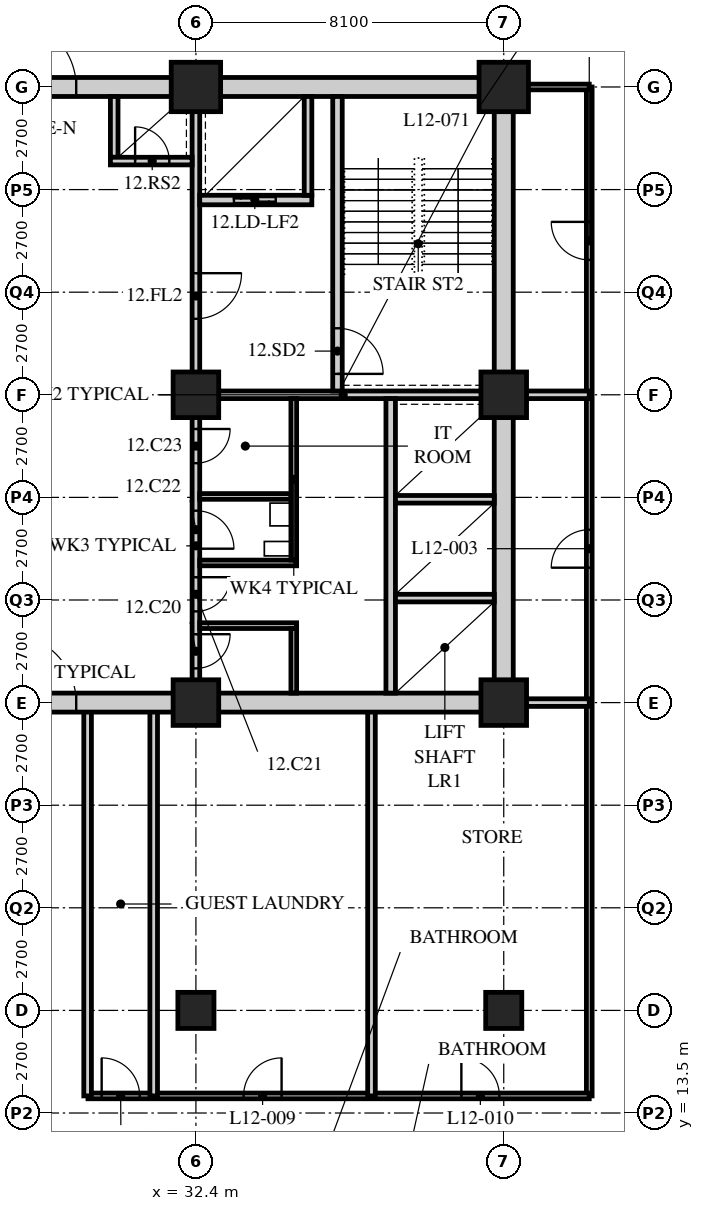
"""IFC4 building model, lengths in metres.
Left out: names, types, materials, properties, quantities, classifications, styles, units other than length and angle.
Written with IfcOpenShell. Run it as: python <this file> out.ifc"""

import sys

from ifc_helpers import new_model, si_unit, direction, frame, frame_2d, origin, origin_2d, place, context, subcontext, project, spatial, rectangle, hollow_rectangle, extrude, element, fill, save


model = new_model("IFC4")
c1 = context("Model", 3, precision=1e-05, world=origin(), true_north=direction((0.0, 1.0)))
c2 = subcontext(c1, "Body", "Model", "MODEL_VIEW")
j1 = project(units=[si_unit("LENGTHUNIT", "METRE"), si_unit("PLANEANGLEUNIT", "RADIAN")], contexts=[c1])
p1 = place(None, origin())
s1 = spatial("IfcSite", under=j1, at=p1, CompositionType="ELEMENT")
p2 = place(p1, origin())
s2 = spatial("IfcBuilding", under=s1, at=p2, CompositionType="ELEMENT")
p3 = place(p2, frame((0.0, 0.0, 53.4)))
s3 = spatial("IfcBuildingStorey", under=s2, at=p3, CompositionType="ELEMENT", Elevation=53.4)
p4 = place(p3, frame((32.4, 16.2, 0.0), z_axis=(0.0, 0.0, 1.0), x_axis=(1.0, 0.0, 0.0)))
e1 = element("IfcColumn", 1, at=p4, inside=s3, PredefinedType="COLUMN", context=c2, shape_type="SweptSolid", body=[
    extrude(hollow_rectangle(XDim=0.95, YDim=0.95, WallThickness=0.095, at=origin_2d()), origin(), (0.0, 0.0, 1.0), 3.4),
])
for number, where, z_axis, x_axis in (
    (2, (32.4, 24.3, 0.0), (0.0, 0.0, 1.0), (1.0, 0.0, 0.0)),
    (3, (32.4, 32.4, 0.0), (0.0, 0.0, 1.0), (1.0, 0.0, 0.0)),
):
    element("IfcColumn", number, at=place(p3, frame(where, z_axis=z_axis, x_axis=x_axis)), inside=s3, PredefinedType="COLUMN", context=c2, shape_type="SweptSolid", body=[
        extrude(hollow_rectangle(XDim=1.2, YDim=1.2, WallThickness=0.12, at=origin_2d()), origin(), (0.0, 0.0, 1.0), 3.4),
    ])
p5 = place(p3, frame((32.4, 40.5, 0.0), z_axis=(0.0, 0.0, 1.0), x_axis=(1.0, 0.0, 0.0)))
e4 = element("IfcColumn", 4, at=p5, inside=s3, PredefinedType="COLUMN", context=c2, shape_type="SweptSolid", body=[
    extrude(hollow_rectangle(XDim=1.3, YDim=1.3, WallThickness=0.13, at=origin_2d()), origin(), (0.0, 0.0, 1.0), 3.4),
])
p6 = place(p3, frame((40.5, 16.2, 0.0), z_axis=(0.0, 0.0, 1.0), x_axis=(1.0, 0.0, 0.0)))
e5 = element("IfcColumn", 5, at=p6, inside=s3, PredefinedType="COLUMN", context=c2, shape_type="SweptSolid", body=[
    extrude(hollow_rectangle(XDim=0.95, YDim=0.95, WallThickness=0.095, at=origin_2d()), origin(), (0.0, 0.0, 1.0), 3.4),
])
for number, where, z_axis, x_axis in (
    (6, (40.5, 24.3, 0.0), (0.0, 0.0, 1.0), (1.0, 0.0, 0.0)),
    (7, (40.5, 32.4, 0.0), (0.0, 0.0, 1.0), (1.0, 0.0, 0.0)),
):
    element("IfcColumn", number, at=place(p3, frame(where, z_axis=z_axis, x_axis=x_axis)), inside=s3, PredefinedType="COLUMN", context=c2, shape_type="SweptSolid", body=[
        extrude(hollow_rectangle(XDim=1.2, YDim=1.2, WallThickness=0.12, at=origin_2d()), origin(), (0.0, 0.0, 1.0), 3.4),
    ])
p7 = place(p3, frame((40.5, 40.5, 0.0), z_axis=(0.0, 0.0, 1.0), x_axis=(1.0, 0.0, 0.0)))
e8 = element("IfcColumn", 8, at=p7, inside=s3, PredefinedType="COLUMN", context=c2, shape_type="SweptSolid", body=[
    extrude(hollow_rectangle(XDim=1.3, YDim=1.3, WallThickness=0.13, at=origin_2d()), origin(), (0.0, 0.0, 1.0), 3.4),
])
p8 = place(p3, frame((42.75, 13.95, 0.0), z_axis=(0.0, 0.0, 1.0), x_axis=(0.0, 1.0, 0.0)))
e9 = element("IfcWall", 9, at=p8, inside=s3, PredefinedType="PARTITIONING", context=c2, shape_type="SweptSolid", body=[
    extrude(rectangle(XDim=26.55, YDim=0.15, at=frame_2d((13.275, 0.0))), origin(), (0.0, 0.0, 1.0), 3.19),
])
p9 = place(p8, frame((13.9, 0.0, 0.0)))
e10 = element("IfcOpeningElement", 10, at=p9, cuts=e9, PredefinedType="OPENING", context=c2, shape_type="SweptSolid", body=[
    extrude(rectangle(XDim=1.0, YDim=2.1, at=frame_2d((0.5, 1.05))), frame((0.0, 0.085, 0.0), z_axis=(0.0, -1.0, 0.0), x_axis=(1.0, 0.0, 0.0)), (0.0, 0.0, 1.0), 0.17),
])
p10 = place(p8, frame((22.0, 0.0, 0.0)))
e11 = element("IfcOpeningElement", 11, at=p10, cuts=e9, PredefinedType="OPENING", context=c2, shape_type="SweptSolid", body=[
    extrude(rectangle(XDim=1.0, YDim=2.1, at=frame_2d((0.5, 1.05))), frame((0.0, 0.085, 0.0), z_axis=(0.0, -1.0, 0.0), x_axis=(1.0, 0.0, 0.0)), (0.0, 0.0, 1.0), 0.17),
])
p11 = place(p3, frame((42.75, 40.5, 0.0), z_axis=(0.0, 0.0, 1.0), x_axis=(-1.0, 0.0, 0.0)))
e12 = element("IfcWall", 12, at=p11, inside=s3, PredefinedType="PARTITIONING", context=c2, shape_type="SweptSolid", body=[
    extrude(rectangle(XDim=2.05, YDim=0.15, at=frame_2d((1.025, 0.0))), origin(), (0.0, 0.0, 1.0), 2.578),
])
p12 = place(p3, frame((29.56, 13.95, 0.0), z_axis=(0.0, 0.0, 1.0), x_axis=(1.0, 0.0, 0.0)))
e13 = element("IfcWall", 13, at=p12, inside=s3, PredefinedType="PARTITIONING", context=c2, shape_type="SweptSolid", body=[
    extrude(rectangle(XDim=13.19, YDim=0.15, at=frame_2d((6.595, 0.0))), origin(), (0.0, 0.0, 1.0), 3.19),
])
p13 = place(p12, frame((0.36, 0.0, 0.0)))
e14 = element("IfcOpeningElement", 14, at=p13, cuts=e13, PredefinedType="OPENING", context=c2, shape_type="SweptSolid", body=[
    extrude(rectangle(XDim=1.0, YDim=2.1, at=frame_2d((0.5, 1.05))), frame((0.0, 0.085, 0.0), z_axis=(0.0, -1.0, 0.0), x_axis=(1.0, 0.0, 0.0)), (0.0, 0.0, 1.0), 0.17),
])
p14 = place(p12, frame((4.094, 0.0, 0.0)))
e15 = element("IfcOpeningElement", 15, at=p14, cuts=e13, PredefinedType="OPENING", context=c2, shape_type="SweptSolid", body=[
    extrude(rectangle(XDim=1.0, YDim=2.1, at=frame_2d((0.5, 1.05))), frame((0.0, 0.085, 0.0), z_axis=(0.0, -1.0, 0.0), x_axis=(1.0, 0.0, 0.0)), (0.0, 0.0, 1.0), 0.17),
])
p15 = place(p12, frame((9.825, 0.0, 0.0)))
e16 = element("IfcOpeningElement", 16, at=p15, cuts=e13, PredefinedType="OPENING", context=c2, shape_type="SweptSolid", body=[
    extrude(rectangle(XDim=1.0, YDim=2.1, at=frame_2d((0.5, 1.05))), frame((0.0, 0.085, 0.0), z_axis=(0.0, -1.0, 0.0), x_axis=(1.0, 0.0, 0.0)), (0.0, 0.0, 1.0), 0.17),
])
p16 = place(p3, frame((40.5, 32.4, 0.0), z_axis=(0.0, 0.0, 1.0), x_axis=(1.0, 0.0, 0.0)))
e17 = element("IfcWall", 17, at=p16, inside=s3, PredefinedType="SOLIDWALL", context=c2, shape_type="SweptSolid", body=[
    extrude(rectangle(XDim=2.25, YDim=0.2, at=frame_2d((1.125, 0.0))), origin(), (0.0, 0.0, 1.0), 2.578),
])
for number, where, z_axis, x_axis in (
    (18, (31.289, 13.95, 0.0), (0.0, 0.0, 1.0), (0.0, 1.0, 0.0)),
    (19, (37.02, 13.95, 0.0), (0.0, 0.0, 1.0), (0.0, 1.0, 0.0)),
    (20, (29.55, 13.95, 0.0), (0.0, 0.0, 1.0), (0.0, 1.0, 0.0)),
):
    element("IfcWall", number, at=place(p3, frame(where, z_axis=z_axis, x_axis=x_axis)), inside=s3, PredefinedType="SOLIDWALL", context=c2, shape_type="SweptSolid", body=[
        extrude(rectangle(XDim=10.35, YDim=0.2, at=frame_2d((5.175, 0.0))), origin(), (0.0, 0.0, 1.0), 3.19),
    ])
p17 = place(p3, frame((40.5, 24.3, 0.0), z_axis=(0.0, 0.0, 1.0), x_axis=(1.0, 0.0, 0.0)))
e21 = element("IfcWall", 21, at=p17, inside=s3, PredefinedType="SOLIDWALL", context=c2, shape_type="SweptSolid", body=[
    extrude(rectangle(XDim=2.25, YDim=0.2, at=frame_2d((1.125, 0.0))), origin(), (0.0, 0.0, 1.0), 2.578),
])
p18 = place(p3, frame((15.95, 24.3, 0.0), z_axis=(0.0, 0.0, 1.0), x_axis=(1.0, 0.0, 0.0)))
e22 = element("IfcWall", 22, at=p18, inside=s3, PredefinedType="SOLIDWALL", context=c2, shape_type="SweptSolid", body=[
    extrude(rectangle(XDim=24.8, YDim=0.5, at=frame_2d((12.4, 0.0))), origin(), (0.0, 0.0, 1.0), 2.54),
])
p19 = place(p18, frame((11.5, 0.0, 0.0)))
e23 = element("IfcOpeningElement", 23, at=p19, cuts=e22, PredefinedType="OPENING", context=c2, shape_type="SweptSolid", body=[
    extrude(rectangle(XDim=1.8, YDim=2.4, at=frame_2d((0.9, 1.2))), frame((0.0, 0.26, 0.0), z_axis=(0.0, -1.0, 0.0), x_axis=(1.0, 0.0, 0.0)), (0.0, 0.0, 1.0), 0.52),
])
p20 = place(p3, frame((15.95, 40.5, 0.0), z_axis=(0.0, 0.0, 1.0), x_axis=(1.0, 0.0, 0.0)))
e24 = element("IfcWall", 24, at=p20, inside=s3, PredefinedType="SOLIDWALL", context=c2, shape_type="SweptSolid", body=[
    extrude(rectangle(XDim=24.8, YDim=0.5, at=frame_2d((12.4, 0.0))), origin(), (0.0, 0.0, 1.0), 2.54),
])
p21 = place(p20, frame((11.5, 0.0, 0.0)))
e25 = element("IfcOpeningElement", 25, at=p21, cuts=e24, PredefinedType="OPENING", context=c2, shape_type="SweptSolid", body=[
    extrude(rectangle(XDim=1.8, YDim=2.4, at=frame_2d((0.9, 1.2))), frame((0.0, 0.26, 0.0), z_axis=(0.0, -1.0, 0.0), x_axis=(1.0, 0.0, 0.0)), (0.0, 0.0, 1.0), 0.52),
])
p22 = place(p3, frame((40.5, 24.55, 0.0), z_axis=(0.0, 0.0, 1.0), x_axis=(0.0, 1.0, 0.0)))
e26 = element("IfcWall", 26, at=p22, inside=s3, PredefinedType="SOLIDWALL", context=c2, shape_type="SweptSolid", body=[
    extrude(rectangle(XDim=15.7, YDim=0.5, at=frame_2d((7.85, 0.0))), origin(), (0.0, 0.0, 1.0), 2.578),
])
p23 = place(p3, frame((32.3, 32.4, 0.0), z_axis=(0.0, 0.0, 1.0), x_axis=(1.0, 0.0, 0.0)))
e27 = element("IfcWall", 27, at=p23, inside=s3, PredefinedType="SOLIDWALL", context=c2, shape_type="SweptSolid", body=[
    extrude(rectangle(XDim=7.95, YDim=0.2, at=frame_2d((3.975, 0.0))), origin(), (0.0, 0.0, 1.0), 2.578),
])
p24 = place(p3, frame((32.4, 32.5, 0.0), z_axis=(0.0, 0.0, 1.0), x_axis=(0.0, 1.0, 0.0)))
e28 = element("IfcWall", 28, at=p24, inside=s3, PredefinedType="SOLIDWALL", context=c2, shape_type="SweptSolid", body=[
    extrude(rectangle(XDim=7.75, YDim=0.2, at=frame_2d((3.875, 0.0))), origin(), (0.0, 0.0, 1.0), 2.578),
])
p25 = place(p24, frame((1.9, 0.0, 0.0)))
e29 = element("IfcOpeningElement", 29, at=p25, cuts=e28, PredefinedType="OPENING", context=c2, shape_type="SweptSolid", body=[
    extrude(rectangle(XDim=1.2, YDim=2.1, at=frame_2d((0.6, 1.05))), frame((0.0, 0.11, 0.0), z_axis=(0.0, -1.0, 0.0), x_axis=(1.0, 0.0, 0.0)), (0.0, 0.0, 1.0), 0.22),
])
p26 = place(p3, frame((37.525, 24.55, 0.0), z_axis=(0.0, 0.0, 1.0), x_axis=(0.0, 1.0, 0.0)))
e30 = element("IfcWall", 30, at=p26, inside=s3, PredefinedType="SOLIDWALL", context=c2, shape_type="SweptSolid", body=[
    extrude(rectangle(XDim=7.75, YDim=0.25, at=frame_2d((3.875, 0.0))), origin(), (0.0, 0.0, 1.0), 3.19),
])
for number, where, z_axis, x_axis in (
    (31, (37.65, 27.05, 0.0), (0.0, 0.0, 1.0), (1.0, 0.0, 0.0)),
    (32, (37.65, 29.65, 0.0), (0.0, 0.0, 1.0), (1.0, 0.0, 0.0)),
):
    element("IfcWall", number, at=place(p3, frame(where, z_axis=z_axis, x_axis=x_axis)), inside=s3, PredefinedType="SOLIDWALL", context=c2, shape_type="SweptSolid", body=[
        extrude(rectangle(XDim=2.6, YDim=0.2, at=frame_2d((1.3, 0.0))), origin(), (0.0, 0.0, 1.0), 3.19),
    ])
p27 = place(p3, frame((36.125, 32.5, 0.0), z_axis=(0.0, 0.0, 1.0), x_axis=(0.0, 1.0, 0.0)))
e33 = element("IfcWall", 33, at=p27, inside=s3, PredefinedType="SOLIDWALL", context=c2, shape_type="SweptSolid", body=[
    extrude(rectangle(XDim=7.75, YDim=0.25, at=frame_2d((3.875, 0.0))), origin(), (0.0, 0.0, 1.0), 3.19),
])
p28 = place(p27, frame((0.45, 0.0, 0.0)))
e34 = element("IfcOpeningElement", 34, at=p28, cuts=e33, PredefinedType="OPENING", context=c2, shape_type="SweptSolid", body=[
    extrude(rectangle(XDim=1.2, YDim=2.1, at=frame_2d((0.6, 1.05))), frame((0.0, 0.135, 0.0), z_axis=(0.0, -1.0, 0.0), x_axis=(1.0, 0.0, 0.0)), (0.0, 0.0, 1.0), 0.27),
])
p29 = place(p3, frame((32.5, 37.525, 0.0), z_axis=(0.0, 0.0, 1.0), x_axis=(1.0, 0.0, 0.0)))
e35 = element("IfcWall", 35, at=p29, inside=s3, PredefinedType="SOLIDWALL", context=c2, shape_type="SweptSolid", body=[
    extrude(rectangle(XDim=2.95, YDim=0.25, at=frame_2d((1.475, 0.0))), origin(), (0.0, 0.0, 1.0), 3.19),
])
p30 = place(p29, frame((0.9, 0.0, 0.0)))
e36 = element("IfcOpeningElement", 36, at=p30, cuts=e35, PredefinedType="OPENING", context=c2, shape_type="SweptSolid", body=[
    extrude(rectangle(XDim=1.1, YDim=2.4, at=frame_2d((0.55, 1.2))), frame((0.0, 0.135, 0.0), z_axis=(0.0, -1.0, 0.0), x_axis=(1.0, 0.0, 0.0)), (0.0, 0.0, 1.0), 0.27),
])
p31 = place(p3, frame((35.35, 37.65, 0.0), z_axis=(0.0, 0.0, 1.0), x_axis=(0.0, 1.0, 0.0)))
e37 = element("IfcWall", 37, at=p31, inside=s3, PredefinedType="SOLIDWALL", context=c2, shape_type="SweptSolid", body=[
    extrude(rectangle(XDim=2.6, YDim=0.2, at=frame_2d((1.3, 0.0))), origin(), (0.0, 0.0, 1.0), 3.19),
])
p32 = place(p3, frame((30.25, 38.65, 0.0), z_axis=(0.0, 0.0, 1.0), x_axis=(0.0, 1.0, 0.0)))
e38 = element("IfcWall", 38, at=p32, inside=s3, PredefinedType="SOLIDWALL", context=c2, shape_type="SweptSolid", body=[
    extrude(rectangle(XDim=1.6, YDim=0.2, at=frame_2d((0.8, 0.0))), origin(), (0.0, 0.0, 1.0), 3.19),
])
p33 = place(p3, frame((30.15, 38.55, 0.0), z_axis=(0.0, 0.0, 1.0), x_axis=(1.0, 0.0, 0.0)))
e39 = element("IfcWall", 39, at=p33, inside=s3, PredefinedType="SOLIDWALL", context=c2, shape_type="SweptSolid", body=[
    extrude(rectangle(XDim=2.15, YDim=0.2, at=frame_2d((1.075, 0.0))), origin(), (0.0, 0.0, 1.0), 3.19),
])
p34 = place(p33, frame((0.65, 0.0, 0.0)))
e40 = element("IfcOpeningElement", 40, at=p34, cuts=e39, PredefinedType="OPENING", context=c2, shape_type="SweptSolid", body=[
    extrude(rectangle(XDim=0.9, YDim=2.1, at=frame_2d((0.45, 1.05))), frame((0.0, 0.11, 0.0), z_axis=(0.0, -1.0, 0.0), x_axis=(1.0, 0.0, 0.0)), (0.0, 0.0, 1.0), 0.22),
])
p35 = place(p3, frame((32.4, 24.55, 0.0), z_axis=(0.0, 0.0, 1.0), x_axis=(0.0, 1.0, 0.0)))
e41 = element("IfcWall", 41, at=p35, inside=s3, PredefinedType="PARTITIONING", context=c2, shape_type="SweptSolid", body=[
    extrude(rectangle(XDim=7.75, YDim=0.2, at=frame_2d((3.875, 0.0))), origin(), (0.0, 0.0, 1.0), 2.578),
])
p36 = place(p35, frame((0.65, 0.0, 0.0)))
e42 = element("IfcOpeningElement", 42, at=p36, cuts=e41, PredefinedType="OPENING", context=c2, shape_type="SweptSolid", body=[
    extrude(rectangle(XDim=0.9, YDim=2.1, at=frame_2d((0.45, 1.05))), frame((0.0, 0.11, 0.0), z_axis=(0.0, -1.0, 0.0), x_axis=(1.0, 0.0, 0.0)), (0.0, 0.0, 1.0), 0.22),
])
p37 = place(p35, frame((2.15, 0.0, 0.0)))
e43 = element("IfcOpeningElement", 43, at=p37, cuts=e41, PredefinedType="OPENING", context=c2, shape_type="SweptSolid", body=[
    extrude(rectangle(XDim=0.9, YDim=2.1, at=frame_2d((0.45, 1.05))), frame((0.0, 0.11, 0.0), z_axis=(0.0, -1.0, 0.0), x_axis=(1.0, 0.0, 0.0)), (0.0, 0.0, 1.0), 0.22),
])
p38 = place(p35, frame((3.8, 0.0, 0.0)))
e44 = element("IfcOpeningElement", 44, at=p38, cuts=e41, PredefinedType="OPENING", context=c2, shape_type="SweptSolid", body=[
    extrude(rectangle(XDim=1.0, YDim=2.1, at=frame_2d((0.5, 1.05))), frame((0.0, 0.11, 0.0), z_axis=(0.0, -1.0, 0.0), x_axis=(1.0, 0.0, 0.0)), (0.0, 0.0, 1.0), 0.22),
])
p39 = place(p35, frame((6.05, 0.0, 0.0)))
e45 = element("IfcOpeningElement", 45, at=p39, cuts=e41, PredefinedType="OPENING", context=c2, shape_type="SweptSolid", body=[
    extrude(rectangle(XDim=0.9, YDim=2.1, at=frame_2d((0.45, 1.05))), frame((0.0, 0.11, 0.0), z_axis=(0.0, -1.0, 0.0), x_axis=(1.0, 0.0, 0.0)), (0.0, 0.0, 1.0), 0.22),
])
for number, where, z_axis, x_axis in (
    (46, (32.5, 26.325, 0.0), (0.0, 0.0, 1.0), (1.0, 0.0, 0.0)),
    (47, (32.5, 27.975, 0.0), (0.0, 0.0, 1.0), (1.0, 0.0, 0.0)),
):
    element("IfcWall", number, at=place(p3, frame(where, z_axis=z_axis, x_axis=x_axis)), inside=s3, PredefinedType="PARTITIONING", context=c2, shape_type="SweptSolid", body=[
        extrude(rectangle(XDim=2.55, YDim=0.15, at=frame_2d((1.275, 0.0))), origin(), (0.0, 0.0, 1.0), 3.19),
    ])
p40 = place(p3, frame((32.5, 29.725, 0.0), z_axis=(0.0, 0.0, 1.0), x_axis=(1.0, 0.0, 0.0)))
e48 = element("IfcWall", 48, at=p40, inside=s3, PredefinedType="PARTITIONING", context=c2, shape_type="SweptSolid", body=[
    extrude(rectangle(XDim=2.4, YDim=0.15, at=frame_2d((1.2, 0.0))), origin(), (0.0, 0.0, 1.0), 3.19),
])
p41 = place(p3, frame((34.975, 24.55, 0.0), z_axis=(0.0, 0.0, 1.0), x_axis=(0.0, 1.0, 0.0)))
e49 = element("IfcWall", 49, at=p41, inside=s3, PredefinedType="PARTITIONING", context=c2, shape_type="SweptSolid", body=[
    extrude(rectangle(XDim=1.7, YDim=0.15, at=frame_2d((0.85, 0.0))), origin(), (0.0, 0.0, 1.0), 3.19),
])
p42 = place(p3, frame((34.975, 28.05, 0.0), z_axis=(0.0, 0.0, 1.0), x_axis=(0.0, 1.0, 0.0)))
e50 = element("IfcWall", 50, at=p42, inside=s3, PredefinedType="PARTITIONING", context=c2, shape_type="SweptSolid", body=[
    extrude(rectangle(XDim=4.25, YDim=0.15, at=frame_2d((2.125, 0.0))), origin(), (0.0, 0.0, 1.0), 3.19),
])
p43 = place(p9, origin())
e51 = element("IfcDoor", 51, at=p43, inside=s3, OperationType="SINGLE_SWING_LEFT", PredefinedType="DOOR", context=c2, shape_type="SweptSolid", body=[
    extrude(rectangle(XDim=1.0, YDim=2.1, at=frame_2d((0.5, 1.05))), frame((0.0, 0.025, 0.0), z_axis=(0.0, -1.0, 0.0), x_axis=(1.0, 0.0, 0.0)), (0.0, 0.0, 1.0), 0.05),
])
fill(e10, e51)
p44 = place(p10, origin())
e52 = element("IfcDoor", 52, at=p44, inside=s3, OperationType="SINGLE_SWING_RIGHT", PredefinedType="DOOR", context=c2, shape_type="SweptSolid", body=[
    extrude(rectangle(XDim=1.0, YDim=2.1, at=frame_2d((0.5, 1.05))), frame((0.0, 0.025, 0.0), z_axis=(0.0, -1.0, 0.0), x_axis=(1.0, 0.0, 0.0)), (0.0, 0.0, 1.0), 0.05),
])
fill(e11, e52)
p45 = place(p13, origin())
e53 = element("IfcDoor", 53, at=p45, inside=s3, OperationType="SINGLE_SWING_LEFT", PredefinedType="DOOR", context=c2, shape_type="SweptSolid", body=[
    extrude(rectangle(XDim=1.0, YDim=2.1, at=frame_2d((0.5, 1.05))), frame((0.0, 0.025, 0.0), z_axis=(0.0, -1.0, 0.0), x_axis=(1.0, 0.0, 0.0)), (0.0, 0.0, 1.0), 0.05),
])
fill(e14, e53)
p46 = place(p14, origin())
e54 = element("IfcDoor", 54, at=p46, inside=s3, OperationType="SINGLE_SWING_RIGHT", PredefinedType="DOOR", context=c2, shape_type="SweptSolid", body=[
    extrude(rectangle(XDim=1.0, YDim=2.1, at=frame_2d((0.5, 1.05))), frame((0.0, 0.025, 0.0), z_axis=(0.0, -1.0, 0.0), x_axis=(1.0, 0.0, 0.0)), (0.0, 0.0, 1.0), 0.05),
])
fill(e15, e54)
p47 = place(p15, origin())
e55 = element("IfcDoor", 55, at=p47, inside=s3, OperationType="SINGLE_SWING_LEFT", PredefinedType="DOOR", context=c2, shape_type="SweptSolid", body=[
    extrude(rectangle(XDim=1.0, YDim=2.1, at=frame_2d((0.5, 1.05))), frame((0.0, 0.025, 0.0), z_axis=(0.0, -1.0, 0.0), x_axis=(1.0, 0.0, 0.0)), (0.0, 0.0, 1.0), 0.05),
])
fill(e16, e55)
p48 = place(p36, origin())
e56 = element("IfcDoor", 56, at=p48, inside=s3, OperationType="SINGLE_SWING_LEFT", PredefinedType="DOOR", context=c2, shape_type="SweptSolid", body=[
    extrude(rectangle(XDim=0.9, YDim=2.1, at=frame_2d((0.45, 1.05))), frame((0.0, 0.025, 0.0), z_axis=(0.0, -1.0, 0.0), x_axis=(1.0, 0.0, 0.0)), (0.0, 0.0, 1.0), 0.05),
])
fill(e42, e56)
p49 = place(p37, origin())
e57 = element("IfcDoor", 57, at=p49, inside=s3, OperationType="SINGLE_SWING_LEFT", PredefinedType="DOOR", context=c2, shape_type="SweptSolid", body=[
    extrude(rectangle(XDim=0.9, YDim=2.1, at=frame_2d((0.45, 1.05))), frame((0.0, 0.025, 0.0), z_axis=(0.0, -1.0, 0.0), x_axis=(1.0, 0.0, 0.0)), (0.0, 0.0, 1.0), 0.05),
])
fill(e43, e57)
p50 = place(p38, origin())
e58 = element("IfcDoor", 58, at=p50, inside=s3, OperationType="SINGLE_SWING_RIGHT", PredefinedType="DOOR", context=c2, shape_type="SweptSolid", body=[
    extrude(rectangle(XDim=1.0, YDim=2.1, at=frame_2d((0.5, 1.05))), frame((0.0, 0.025, 0.0), z_axis=(0.0, -1.0, 0.0), x_axis=(1.0, 0.0, 0.0)), (0.0, 0.0, 1.0), 0.05),
])
fill(e44, e58)
p51 = place(p39, origin())
e59 = element("IfcDoor", 59, at=p51, inside=s3, OperationType="SINGLE_SWING_LEFT", PredefinedType="DOOR", context=c2, shape_type="SweptSolid", body=[
    extrude(rectangle(XDim=0.9, YDim=2.1, at=frame_2d((0.45, 1.05))), frame((0.0, 0.025, 0.0), z_axis=(0.0, -1.0, 0.0), x_axis=(1.0, 0.0, 0.0)), (0.0, 0.0, 1.0), 0.05),
])
fill(e45, e59)
p52 = place(p28, origin())
e60 = element("IfcDoor", 60, at=p52, inside=s3, OperationType="SINGLE_SWING_RIGHT", PredefinedType="DOOR", context=c2, shape_type="SweptSolid", body=[
    extrude(rectangle(XDim=1.2, YDim=2.1, at=frame_2d((0.6, 1.05))), frame((0.0, 0.025, 0.0), z_axis=(0.0, -1.0, 0.0), x_axis=(1.0, 0.0, 0.0)), (0.0, 0.0, 1.0), 0.05),
])
fill(e34, e60)
p53 = place(p25, origin())
e61 = element("IfcDoor", 61, at=p53, inside=s3, OperationType="SINGLE_SWING_LEFT", PredefinedType="DOOR", context=c2, shape_type="SweptSolid", body=[
    extrude(rectangle(XDim=1.2, YDim=2.1, at=frame_2d((0.6, 1.05))), frame((0.0, 0.025, 0.0), z_axis=(0.0, -1.0, 0.0), x_axis=(1.0, 0.0, 0.0)), (0.0, 0.0, 1.0), 0.05),
])
fill(e29, e61)
p54 = place(p34, origin())
e62 = element("IfcDoor", 62, at=p54, inside=s3, OperationType="SINGLE_SWING_LEFT", PredefinedType="DOOR", context=c2, shape_type="SweptSolid", body=[
    extrude(rectangle(XDim=0.9, YDim=2.1, at=frame_2d((0.45, 1.05))), frame((0.0, 0.025, 0.0), z_axis=(0.0, -1.0, 0.0), x_axis=(1.0, 0.0, 0.0)), (0.0, 0.0, 1.0), 0.05),
])
fill(e40, e62)
p55 = place(p30, origin())
e63 = element("IfcDoor", 63, at=p55, inside=s3, OperationType="DOUBLE_DOOR_SLIDING", PredefinedType="DOOR", context=c2, shape_type="SweptSolid", body=[
    extrude(rectangle(XDim=1.1, YDim=2.4, at=frame_2d((0.55, 1.2))), frame((0.0, 0.025, 0.0), z_axis=(0.0, -1.0, 0.0), x_axis=(1.0, 0.0, 0.0)), (0.0, 0.0, 1.0), 0.05),
])
fill(e36, e63)
p56 = place(p19, origin())
e64 = element("IfcDoor", 64, at=p56, inside=s3, OperationType="DOUBLE_DOOR_SINGLE_SWING", PredefinedType="DOOR", context=c2, shape_type="SweptSolid", body=[
    extrude(rectangle(XDim=1.8, YDim=2.4, at=frame_2d((0.9, 1.2))), frame((0.0, 0.025, 0.0), z_axis=(0.0, -1.0, 0.0), x_axis=(1.0, 0.0, 0.0)), (0.0, 0.0, 1.0), 0.05),
])
fill(e23, e64)
p57 = place(p21, origin())
e65 = element("IfcDoor", 65, at=p57, inside=s3, OperationType="DOUBLE_DOOR_SINGLE_SWING", PredefinedType="DOOR", context=c2, shape_type="SweptSolid", body=[
    extrude(rectangle(XDim=1.8, YDim=2.4, at=frame_2d((0.9, 1.2))), frame((0.0, 0.025, 0.0), z_axis=(0.0, -1.0, 0.0), x_axis=(1.0, 0.0, 0.0)), (0.0, 0.0, 1.0), 0.05),
])
fill(e25, e65)
save(model, sys.argv[1])
